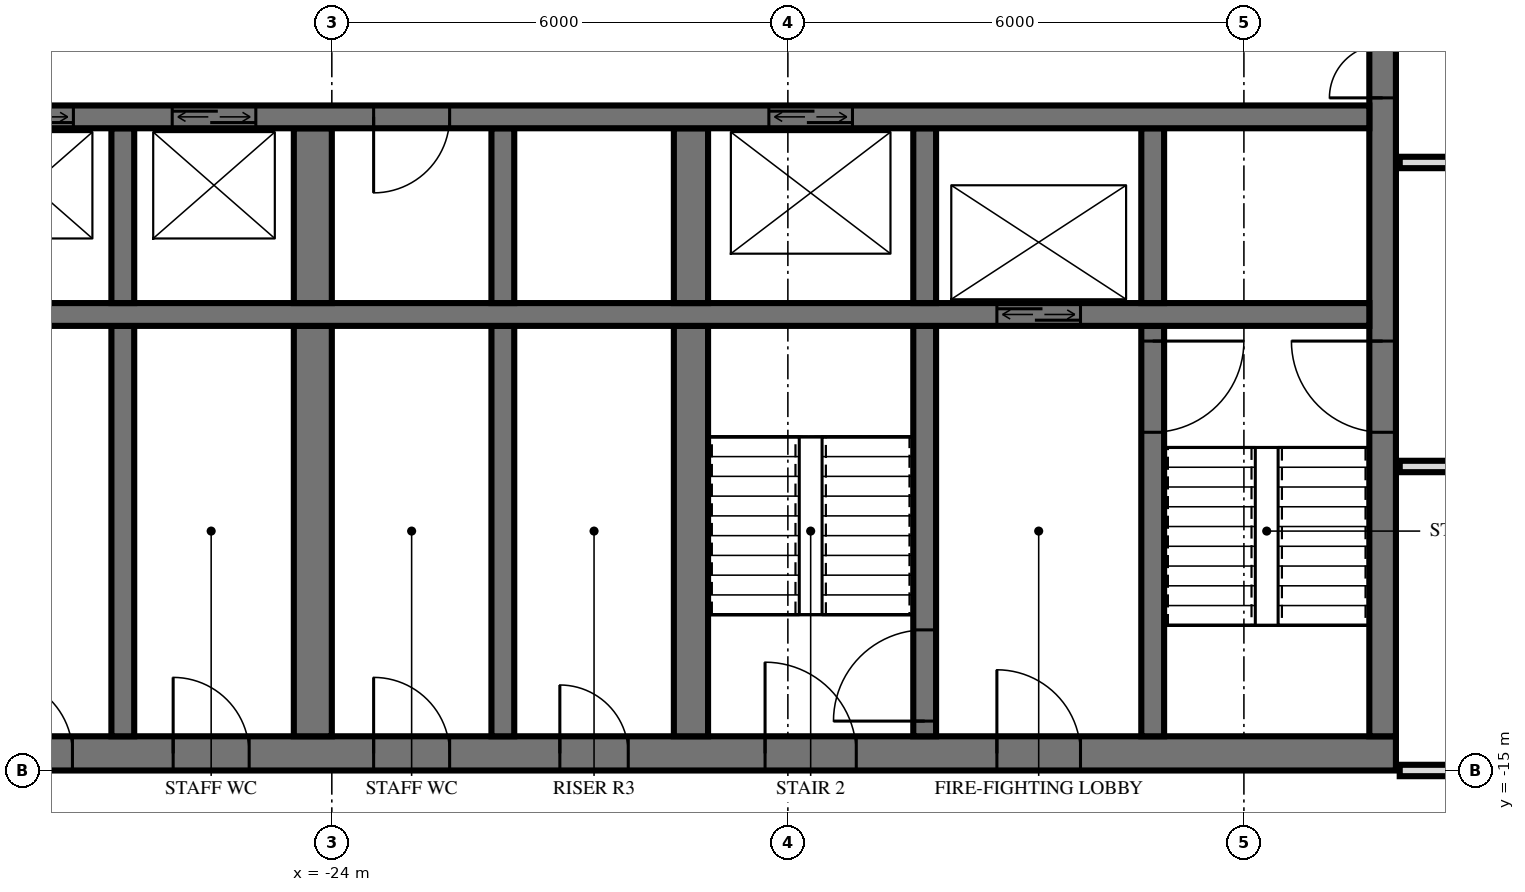
"""IFC4 building model, lengths in metres.
Left out: names, types, materials, properties, quantities, classifications, styles, units other than length and angle.
Written with IfcOpenShell. Run it as: python <this file> out.ifc"""

import sys

from ifc_helpers import new_model, si_unit, direction, frame, frame_2d, origin, place, context, subcontext, project, spatial, rectangle, extrude, element, fill, save


model = new_model("IFC4")
c1 = context("Model", 3, precision=1e-05, world=origin(), true_north=direction((0.0, 1.0)))
c2 = subcontext(c1, "Body", "Model", "MODEL_VIEW")
j1 = project(units=[si_unit("LENGTHUNIT", "METRE"), si_unit("PLANEANGLEUNIT", "RADIAN")], contexts=[c1])
p1 = place(None, origin())
s1 = spatial("IfcSite", under=j1, at=p1, CompositionType="ELEMENT")
p2 = place(p1, origin())
s2 = spatial("IfcBuilding", under=s1, at=p2, CompositionType="ELEMENT")
p3 = place(p2, frame((0.0, 0.0, 60.0)))
s3 = spatial("IfcBuildingStorey", under=s2, at=p3, CompositionType="ELEMENT", Elevation=60.0)
p4 = place(p3, frame((-29.5, -14.775, 0.0), z_axis=(0.0, 0.0, 1.0), x_axis=(1.0, 0.0, 0.0)))
e1 = element("IfcWall", 1, at=p4, inside=s3, PredefinedType="SHEAR", context=c2, shape_type="SweptSolid", body=[
    extrude(rectangle(XDim=19.5, YDim=0.45, at=frame_2d((9.75, 0.0))), origin(), (0.0, 0.0, 1.0), 3.6),
])
p5 = place(p4, frame((11.2, 0.0, 0.0)))
e2 = element("IfcOpeningElement", 2, at=p5, cuts=e1, PredefinedType="OPENING", context=c2, shape_type="SweptSolid", body=[
    extrude(rectangle(XDim=1.2, YDim=2.1, at=frame_2d((0.6, 1.05))), frame((0.0, 0.235, 0.0), z_axis=(0.0, -1.0, 0.0), x_axis=(1.0, 0.0, 0.0)), (0.0, 0.0, 1.0), 0.47),
])
p6 = place(p4, frame((14.25, 0.0, 0.0)))
e3 = element("IfcOpeningElement", 3, at=p6, cuts=e1, PredefinedType="OPENING", context=c2, shape_type="SweptSolid", body=[
    extrude(rectangle(XDim=1.1, YDim=2.1, at=frame_2d((0.55, 1.05))), frame((0.0, 0.235, 0.0), z_axis=(0.0, -1.0, 0.0), x_axis=(1.0, 0.0, 0.0)), (0.0, 0.0, 1.0), 0.47),
])
p7 = place(p4, frame((8.5, 0.0, 0.0)))
e4 = element("IfcOpeningElement", 4, at=p7, cuts=e1, PredefinedType="OPENING", context=c2, shape_type="SweptSolid", body=[
    extrude(rectangle(XDim=0.9, YDim=2.1, at=frame_2d((0.45, 1.05))), frame((0.0, 0.235, 0.0), z_axis=(0.0, -1.0, 0.0), x_axis=(1.0, 0.0, 0.0)), (0.0, 0.0, 1.0), 0.47),
])
p8 = place(p4, frame((6.05, 0.0, 0.0)))
e5 = element("IfcOpeningElement", 5, at=p8, cuts=e1, PredefinedType="OPENING", context=c2, shape_type="SweptSolid", body=[
    extrude(rectangle(XDim=1.0, YDim=2.1, at=frame_2d((0.5, 1.05))), frame((0.0, 0.235, 0.0), z_axis=(0.0, -1.0, 0.0), x_axis=(1.0, 0.0, 0.0)), (0.0, 0.0, 1.0), 0.47),
])
p9 = place(p4, frame((3.413, 0.0, 0.0)))
e6 = element("IfcOpeningElement", 6, at=p9, cuts=e1, PredefinedType="OPENING", context=c2, shape_type="SweptSolid", body=[
    extrude(rectangle(XDim=1.0, YDim=2.1, at=frame_2d((0.5, 1.05))), frame((0.0, 0.235, 0.0), z_axis=(0.0, -1.0, 0.0), x_axis=(1.0, 0.0, 0.0)), (0.0, 0.0, 1.0), 0.47),
])
p10 = place(p4, frame((1.087, 0.0, 0.0)))
e7 = element("IfcOpeningElement", 7, at=p10, cuts=e1, PredefinedType="OPENING", context=c2, shape_type="SweptSolid", body=[
    extrude(rectangle(XDim=1.0, YDim=2.1, at=frame_2d((0.5, 1.05))), frame((0.0, 0.235, 0.0), z_axis=(0.0, -1.0, 0.0), x_axis=(1.0, 0.0, 0.0)), (0.0, 0.0, 1.0), 0.47),
])
p11 = place(p3, frame((-10.175, -14.55, 0.0), z_axis=(0.0, 0.0, 1.0), x_axis=(0.0, 1.0, 0.0)))
e8 = element("IfcWall", 8, at=p11, inside=s3, PredefinedType="SHEAR", context=c2, shape_type="SweptSolid", body=[
    extrude(rectangle(XDim=14.1, YDim=0.35, at=frame_2d((7.05, 0.0))), origin(), (0.0, 0.0, 1.0), 3.6),
])
p12 = place(p11, frame((8.4, 0.0, 0.0)))
e9 = element("IfcOpeningElement", 9, at=p12, cuts=e8, PredefinedType="OPENING", context=c2, shape_type="SweptSolid", body=[
    extrude(rectangle(XDim=1.4, YDim=2.4, at=frame_2d((0.7, 1.2))), frame((0.0, 0.185, 0.0), z_axis=(0.0, -1.0, 0.0), x_axis=(1.0, 0.0, 0.0)), (0.0, 0.0, 1.0), 0.37),
])
p13 = place(p11, frame((10.0, 0.0, 0.0)))
e10 = element("IfcOpeningElement", 10, at=p13, cuts=e8, PredefinedType="OPENING", context=c2, shape_type="SweptSolid", body=[
    extrude(rectangle(XDim=1.4, YDim=2.4, at=frame_2d((0.7, 1.2))), frame((0.0, 0.185, 0.0), z_axis=(0.0, -1.0, 0.0), x_axis=(1.0, 0.0, 0.0)), (0.0, 0.0, 1.0), 0.37),
])
p14 = place(p11, frame((4.0, 0.0, 0.0)))
e11 = element("IfcOpeningElement", 11, at=p14, cuts=e8, PredefinedType="OPENING", context=c2, shape_type="SweptSolid", body=[
    extrude(rectangle(XDim=1.2, YDim=2.1, at=frame_2d((0.6, 1.05))), frame((0.0, 0.185, 0.0), z_axis=(0.0, -1.0, 0.0), x_axis=(1.0, 0.0, 0.0)), (0.0, 0.0, 1.0), 0.37),
])
p15 = place(p3, frame((-29.05, -6.4, 0.0), z_axis=(0.0, 0.0, 1.0), x_axis=(1.0, 0.0, 0.0)))
e12 = element("IfcWall", 12, at=p15, inside=s3, PredefinedType="SHEAR", context=c2, shape_type="SweptSolid", body=[
    extrude(rectangle(XDim=18.7, YDim=0.3, at=frame_2d((9.35, 0.0))), origin(), (0.0, 0.0, 1.0), 3.6),
])
p16 = place(p15, frame((2.95, 0.0, 0.0)))
e13 = element("IfcOpeningElement", 13, at=p16, cuts=e12, PredefinedType="OPENING", context=c2, shape_type="SweptSolid", body=[
    extrude(rectangle(XDim=1.1, YDim=2.1, at=frame_2d((0.55, 1.05))), frame((0.0, 0.16, 0.0), z_axis=(0.0, -1.0, 0.0), x_axis=(1.0, 0.0, 0.0)), (0.0, 0.0, 1.0), 0.32),
])
p17 = place(p15, frame((0.55, 0.0, 0.0)))
e14 = element("IfcOpeningElement", 14, at=p17, cuts=e12, PredefinedType="OPENING", context=c2, shape_type="SweptSolid", body=[
    extrude(rectangle(XDim=1.1, YDim=2.1, at=frame_2d((0.55, 1.05))), frame((0.0, 0.16, 0.0), z_axis=(0.0, -1.0, 0.0), x_axis=(1.0, 0.0, 0.0)), (0.0, 0.0, 1.0), 0.32),
])
p18 = place(p15, frame((10.8, 0.0, 0.0)))
e15 = element("IfcOpeningElement", 15, at=p18, cuts=e12, PredefinedType="OPENING", context=c2, shape_type="SweptSolid", body=[
    extrude(rectangle(XDim=1.1, YDim=2.1, at=frame_2d((0.55, 1.05))), frame((0.0, 0.16, 0.0), z_axis=(0.0, -1.0, 0.0), x_axis=(1.0, 0.0, 0.0)), (0.0, 0.0, 1.0), 0.32),
])
p19 = place(p15, frame((5.6, 0.0, 0.0)))
e16 = element("IfcOpeningElement", 16, at=p19, cuts=e12, PredefinedType="OPENING", context=c2, shape_type="SweptSolid", body=[
    extrude(rectangle(XDim=1.0, YDim=2.1, at=frame_2d((0.5, 1.05))), frame((0.0, 0.16, 0.0), z_axis=(0.0, -1.0, 0.0), x_axis=(1.0, 0.0, 0.0)), (0.0, 0.0, 1.0), 0.32),
])
p20 = place(p3, frame((-29.05, -9.0, 0.0), z_axis=(0.0, 0.0, 1.0), x_axis=(1.0, 0.0, 0.0)))
e17 = element("IfcWall", 17, at=p20, inside=s3, PredefinedType="SHEAR", context=c2, shape_type="SweptSolid", body=[
    extrude(rectangle(XDim=18.7, YDim=0.3, at=frame_2d((9.35, 0.0))), origin(), (0.0, 0.0, 1.0), 3.6),
])
p21 = place(p20, frame((13.8, 0.0, 0.0)))
e18 = element("IfcOpeningElement", 18, at=p21, cuts=e17, PredefinedType="OPENING", context=c2, shape_type="SweptSolid", body=[
    extrude(rectangle(XDim=1.1, YDim=2.1, at=frame_2d((0.55, 1.05))), frame((0.0, 0.16, 0.0), z_axis=(0.0, -1.0, 0.0), x_axis=(1.0, 0.0, 0.0)), (0.0, 0.0, 1.0), 0.32),
])
p22 = place(p3, frame((-13.2, -8.85, 0.0), z_axis=(0.0, 0.0, 1.0), x_axis=(0.0, 1.0, 0.0)))
e19 = element("IfcWall", 19, at=p22, inside=s3, PredefinedType="SHEAR", context=c2, shape_type="SweptSolid", body=[
    extrude(rectangle(XDim=2.3, YDim=0.3, at=frame_2d((1.15, 0.0))), origin(), (0.0, 0.0, 1.0), 3.6),
])
p23 = place(p3, frame((-13.2, -14.55, 0.0), z_axis=(0.0, 0.0, 1.0), x_axis=(0.0, 1.0, 0.0)))
e20 = element("IfcWall", 20, at=p23, inside=s3, PredefinedType="SHEAR", context=c2, shape_type="SweptSolid", body=[
    extrude(rectangle(XDim=5.4, YDim=0.3, at=frame_2d((2.7, 0.0))), origin(), (0.0, 0.0, 1.0), 3.6),
])
p24 = place(p23, frame((4.0, 0.0, 0.0)))
e21 = element("IfcOpeningElement", 21, at=p24, cuts=e20, PredefinedType="OPENING", context=c2, shape_type="SweptSolid", body=[
    extrude(rectangle(XDim=1.2, YDim=2.1, at=frame_2d((0.6, 1.05))), frame((0.0, 0.16, 0.0), z_axis=(0.0, -1.0, 0.0), x_axis=(1.0, 0.0, 0.0)), (0.0, 0.0, 1.0), 0.32),
])
p25 = place(p3, frame((-16.2, -8.85, 0.0), z_axis=(0.0, 0.0, 1.0), x_axis=(0.0, 1.0, 0.0)))
e22 = element("IfcWall", 22, at=p25, inside=s3, PredefinedType="SHEAR", context=c2, shape_type="SweptSolid", body=[
    extrude(rectangle(XDim=2.3, YDim=0.3, at=frame_2d((1.15, 0.0))), origin(), (0.0, 0.0, 1.0), 3.6),
])
p26 = place(p3, frame((-16.2, -14.55, 0.0), z_axis=(0.0, 0.0, 1.0), x_axis=(0.0, 1.0, 0.0)))
e23 = element("IfcWall", 23, at=p26, inside=s3, PredefinedType="SHEAR", context=c2, shape_type="SweptSolid", body=[
    extrude(rectangle(XDim=5.4, YDim=0.3, at=frame_2d((2.7, 0.0))), origin(), (0.0, 0.0, 1.0), 3.6),
])
p27 = place(p26, frame((0.2, 0.0, 0.0)))
e24 = element("IfcOpeningElement", 24, at=p27, cuts=e23, PredefinedType="OPENING", context=c2, shape_type="SweptSolid", body=[
    extrude(rectangle(XDim=1.2, YDim=2.1, at=frame_2d((0.6, 1.05))), frame((0.0, 0.16, 0.0), z_axis=(0.0, -1.0, 0.0), x_axis=(1.0, 0.0, 0.0)), (0.0, 0.0, 1.0), 0.32),
])
p28 = place(p3, frame((-19.275, -8.85, 0.0), z_axis=(0.0, 0.0, 1.0), x_axis=(0.0, 1.0, 0.0)))
e25 = element("IfcWall", 25, at=p28, inside=s3, PredefinedType="SHEAR", context=c2, shape_type="SweptSolid", body=[
    extrude(rectangle(XDim=2.3, YDim=0.45, at=frame_2d((1.15, 0.0))), origin(), (0.0, 0.0, 1.0), 3.6),
])
p29 = place(p3, frame((-19.275, -14.55, 0.0), z_axis=(0.0, 0.0, 1.0), x_axis=(0.0, 1.0, 0.0)))
e26 = element("IfcWall", 26, at=p29, inside=s3, PredefinedType="SHEAR", context=c2, shape_type="SweptSolid", body=[
    extrude(rectangle(XDim=5.4, YDim=0.45, at=frame_2d((2.7, 0.0))), origin(), (0.0, 0.0, 1.0), 3.6),
])
p30 = place(p3, frame((-21.75, -8.85, 0.0), z_axis=(0.0, 0.0, 1.0), x_axis=(0.0, 1.0, 0.0)))
e27 = element("IfcWall", 27, at=p30, inside=s3, PredefinedType="SHEAR", context=c2, shape_type="SweptSolid", body=[
    extrude(rectangle(XDim=2.3, YDim=0.3, at=frame_2d((1.15, 0.0))), origin(), (0.0, 0.0, 1.0), 3.6),
])
p31 = place(p3, frame((-21.75, -14.55, 0.0), z_axis=(0.0, 0.0, 1.0), x_axis=(0.0, 1.0, 0.0)))
e28 = element("IfcWall", 28, at=p31, inside=s3, PredefinedType="SHEAR", context=c2, shape_type="SweptSolid", body=[
    extrude(rectangle(XDim=5.4, YDim=0.3, at=frame_2d((2.7, 0.0))), origin(), (0.0, 0.0, 1.0), 3.6),
])
p32 = place(p3, frame((-24.25, -8.85, 0.0), z_axis=(0.0, 0.0, 1.0), x_axis=(0.0, 1.0, 0.0)))
e29 = element("IfcWall", 29, at=p32, inside=s3, PredefinedType="SHEAR", context=c2, shape_type="SweptSolid", body=[
    extrude(rectangle(XDim=2.3, YDim=0.5, at=frame_2d((1.15, 0.0))), origin(), (0.0, 0.0, 1.0), 3.6),
])
p33 = place(p3, frame((-24.25, -14.55, 0.0), z_axis=(0.0, 0.0, 1.0), x_axis=(0.0, 1.0, 0.0)))
e30 = element("IfcWall", 30, at=p33, inside=s3, PredefinedType="SHEAR", context=c2, shape_type="SweptSolid", body=[
    extrude(rectangle(XDim=5.4, YDim=0.5, at=frame_2d((2.7, 0.0))), origin(), (0.0, 0.0, 1.0), 3.6),
])
p34 = place(p3, frame((-26.75, -8.85, 0.0), z_axis=(0.0, 0.0, 1.0), x_axis=(0.0, 1.0, 0.0)))
e31 = element("IfcWall", 31, at=p34, inside=s3, PredefinedType="SHEAR", context=c2, shape_type="SweptSolid", body=[
    extrude(rectangle(XDim=2.3, YDim=0.3, at=frame_2d((1.15, 0.0))), origin(), (0.0, 0.0, 1.0), 3.6),
])
p35 = place(p3, frame((-26.75, -14.55, 0.0), z_axis=(0.0, 0.0, 1.0), x_axis=(0.0, 1.0, 0.0)))
e32 = element("IfcWall", 32, at=p35, inside=s3, PredefinedType="SHEAR", context=c2, shape_type="SweptSolid", body=[
    extrude(rectangle(XDim=5.4, YDim=0.3, at=frame_2d((2.7, 0.0))), origin(), (0.0, 0.0, 1.0), 3.6),
])
p36 = place(p3, frame((-9.95, -15.0, 0.0), z_axis=(0.0, 0.0, 1.0), x_axis=(1.0, 0.0, 0.0)))
e33 = element("IfcWall", 33, at=p36, inside=s3, PredefinedType="PARTITIONING", context=c2, shape_type="SweptSolid", body=[
    extrude(rectangle(XDim=19.9, YDim=0.15, at=frame_2d((9.95, 0.0))), origin(), (0.0, 0.0, 1.0), 2.684),
])
p37 = place(p36, frame((9.45, 0.0, 0.0)))
e34 = element("IfcOpeningElement", 34, at=p37, cuts=e33, PredefinedType="OPENING", context=c2, shape_type="SweptSolid", body=[
    extrude(rectangle(XDim=1.0, YDim=2.1, at=frame_2d((0.5, 1.05))), frame((0.0, 0.085, 0.0), z_axis=(0.0, -1.0, 0.0), x_axis=(1.0, 0.0, 0.0)), (0.0, 0.0, 1.0), 0.17),
])
p38 = place(p3, frame((-9.95, -11.0, 0.0), z_axis=(0.0, 0.0, 1.0), x_axis=(1.0, 0.0, 0.0)))
e35 = element("IfcWall", 35, at=p38, inside=s3, PredefinedType="PARTITIONING", context=c2, shape_type="SweptSolid", body=[
    extrude(rectangle(XDim=19.9, YDim=0.15, at=frame_2d((9.95, 0.0))), origin(), (0.0, 0.0, 1.0), 3.32),
])
p39 = place(p38, frame((9.45, 0.0, 0.0)))
e36 = element("IfcOpeningElement", 36, at=p39, cuts=e35, PredefinedType="OPENING", context=c2, shape_type="SweptSolid", body=[
    extrude(rectangle(XDim=1.0, YDim=2.1, at=frame_2d((0.5, 1.05))), frame((0.0, 0.085, 0.0), z_axis=(0.0, -1.0, 0.0), x_axis=(1.0, 0.0, 0.0)), (0.0, 0.0, 1.0), 0.17),
])
p40 = place(p38, frame((3.45, 0.0, 0.0)))
e37 = element("IfcOpeningElement", 37, at=p40, cuts=e35, PredefinedType="OPENING", context=c2, shape_type="SweptSolid", body=[
    extrude(rectangle(XDim=1.0, YDim=2.1, at=frame_2d((0.5, 1.05))), frame((0.0, 0.085, 0.0), z_axis=(0.0, -1.0, 0.0), x_axis=(1.0, 0.0, 0.0)), (0.0, 0.0, 1.0), 0.17),
])
p41 = place(p3, frame((-9.95, -7.0, 0.0), z_axis=(0.0, 0.0, 1.0), x_axis=(1.0, 0.0, 0.0)))
e38 = element("IfcWall", 38, at=p41, inside=s3, PredefinedType="PARTITIONING", context=c2, shape_type="SweptSolid", body=[
    extrude(rectangle(XDim=19.9, YDim=0.15, at=frame_2d((9.95, 0.0))), origin(), (0.0, 0.0, 1.0), 3.32),
])
p42 = place(p41, frame((9.45, 0.0, 0.0)))
e39 = element("IfcOpeningElement", 39, at=p42, cuts=e38, PredefinedType="OPENING", context=c2, shape_type="SweptSolid", body=[
    extrude(rectangle(XDim=1.0, YDim=2.1, at=frame_2d((0.5, 1.05))), frame((0.0, 0.085, 0.0), z_axis=(0.0, -1.0, 0.0), x_axis=(1.0, 0.0, 0.0)), (0.0, 0.0, 1.0), 0.17),
])
p43 = place(p41, frame((15.45, 0.0, 0.0)))
e40 = element("IfcOpeningElement", 40, at=p43, cuts=e38, PredefinedType="OPENING", context=c2, shape_type="SweptSolid", body=[
    extrude(rectangle(XDim=1.0, YDim=2.1, at=frame_2d((0.5, 1.05))), frame((0.0, 0.085, 0.0), z_axis=(0.0, -1.0, 0.0), x_axis=(1.0, 0.0, 0.0)), (0.0, 0.0, 1.0), 0.17),
])
p44 = place(p16, origin())
e41 = element("IfcDoor", 41, at=p44, inside=s3, OperationType="DOUBLE_DOOR_SLIDING", PredefinedType="USERDEFINED", context=c2, shape_type="SweptSolid", body=[
    extrude(rectangle(XDim=1.1, YDim=2.1, at=frame_2d((0.55, 1.05))), frame((0.0, 0.025, 0.0), z_axis=(0.0, -1.0, 0.0), x_axis=(1.0, 0.0, 0.0)), (0.0, 0.0, 1.0), 0.05),
])
fill(e13, e41)
p45 = place(p17, origin())
e42 = element("IfcDoor", 42, at=p45, inside=s3, OperationType="DOUBLE_DOOR_SLIDING", PredefinedType="USERDEFINED", context=c2, shape_type="SweptSolid", body=[
    extrude(rectangle(XDim=1.1, YDim=2.1, at=frame_2d((0.55, 1.05))), frame((0.0, 0.025, 0.0), z_axis=(0.0, -1.0, 0.0), x_axis=(1.0, 0.0, 0.0)), (0.0, 0.0, 1.0), 0.05),
])
fill(e14, e42)
p46 = place(p21, origin())
e43 = element("IfcDoor", 43, at=p46, inside=s3, OperationType="DOUBLE_DOOR_SLIDING", PredefinedType="USERDEFINED", context=c2, shape_type="SweptSolid", body=[
    extrude(rectangle(XDim=1.1, YDim=2.1, at=frame_2d((0.55, 1.05))), frame((0.0, 0.025, 0.0), z_axis=(0.0, -1.0, 0.0), x_axis=(1.0, 0.0, 0.0)), (0.0, 0.0, 1.0), 0.05),
])
fill(e18, e43)
p47 = place(p18, origin())
e44 = element("IfcDoor", 44, at=p47, inside=s3, OperationType="DOUBLE_DOOR_SLIDING", PredefinedType="USERDEFINED", context=c2, shape_type="SweptSolid", body=[
    extrude(rectangle(XDim=1.1, YDim=2.1, at=frame_2d((0.55, 1.05))), frame((0.0, 0.025, 0.0), z_axis=(0.0, -1.0, 0.0), x_axis=(1.0, 0.0, 0.0)), (0.0, 0.0, 1.0), 0.05),
])
fill(e15, e44)
p48 = place(p12, origin())
e45 = element("IfcDoor", 45, at=p48, inside=s3, OperationType="DOUBLE_DOOR_SINGLE_SWING", PredefinedType="DOOR", context=c2, shape_type="SweptSolid", body=[
    extrude(rectangle(XDim=1.4, YDim=2.4, at=frame_2d((0.7, 1.2))), frame((0.0, 0.025, 0.0), z_axis=(0.0, -1.0, 0.0), x_axis=(1.0, 0.0, 0.0)), (0.0, 0.0, 1.0), 0.05),
])
fill(e9, e45)
p49 = place(p14, origin())
e46 = element("IfcDoor", 46, at=p49, inside=s3, OperationType="SINGLE_SWING_LEFT", PredefinedType="DOOR", context=c2, shape_type="SweptSolid", body=[
    extrude(rectangle(XDim=1.2, YDim=2.1, at=frame_2d((0.6, 1.05))), frame((0.0, 0.025, 0.0), z_axis=(0.0, -1.0, 0.0), x_axis=(1.0, 0.0, 0.0)), (0.0, 0.0, 1.0), 0.05),
])
fill(e11, e46)
p50 = place(p5, origin())
e47 = element("IfcDoor", 47, at=p50, inside=s3, OperationType="SINGLE_SWING_RIGHT", PredefinedType="DOOR", context=c2, shape_type="SweptSolid", body=[
    extrude(rectangle(XDim=1.2, YDim=2.1, at=frame_2d((0.6, 1.05))), frame((0.0, 0.025, 0.0), z_axis=(0.0, -1.0, 0.0), x_axis=(1.0, 0.0, 0.0)), (0.0, 0.0, 1.0), 0.05),
])
fill(e2, e47)
p51 = place(p6, origin())
e48 = element("IfcDoor", 48, at=p51, inside=s3, OperationType="SINGLE_SWING_RIGHT", PredefinedType="DOOR", context=c2, shape_type="SweptSolid", body=[
    extrude(rectangle(XDim=1.1, YDim=2.1, at=frame_2d((0.55, 1.05))), frame((0.0, 0.025, 0.0), z_axis=(0.0, -1.0, 0.0), x_axis=(1.0, 0.0, 0.0)), (0.0, 0.0, 1.0), 0.05),
])
fill(e3, e48)
p52 = place(p7, origin())
e49 = element("IfcDoor", 49, at=p52, inside=s3, OperationType="SINGLE_SWING_RIGHT", PredefinedType="DOOR", context=c2, shape_type="SweptSolid", body=[
    extrude(rectangle(XDim=0.9, YDim=2.1, at=frame_2d((0.45, 1.05))), frame((0.0, 0.025, 0.0), z_axis=(0.0, -1.0, 0.0), x_axis=(1.0, 0.0, 0.0)), (0.0, 0.0, 1.0), 0.05),
])
fill(e4, e49)
p53 = place(p8, origin())
e50 = element("IfcDoor", 50, at=p53, inside=s3, OperationType="SINGLE_SWING_RIGHT", PredefinedType="DOOR", context=c2, shape_type="SweptSolid", body=[
    extrude(rectangle(XDim=1.0, YDim=2.1, at=frame_2d((0.5, 1.05))), frame((0.0, 0.025, 0.0), z_axis=(0.0, -1.0, 0.0), x_axis=(1.0, 0.0, 0.0)), (0.0, 0.0, 1.0), 0.05),
])
fill(e5, e50)
p54 = place(p9, origin())
e51 = element("IfcDoor", 51, at=p54, inside=s3, OperationType="SINGLE_SWING_RIGHT", PredefinedType="DOOR", context=c2, shape_type="SweptSolid", body=[
    extrude(rectangle(XDim=1.0, YDim=2.1, at=frame_2d((0.5, 1.05))), frame((0.0, 0.025, 0.0), z_axis=(0.0, -1.0, 0.0), x_axis=(1.0, 0.0, 0.0)), (0.0, 0.0, 1.0), 0.05),
])
fill(e6, e51)
p55 = place(p10, origin())
e52 = element("IfcDoor", 52, at=p55, inside=s3, OperationType="SINGLE_SWING_RIGHT", PredefinedType="DOOR", context=c2, shape_type="SweptSolid", body=[
    extrude(rectangle(XDim=1.0, YDim=2.1, at=frame_2d((0.5, 1.05))), frame((0.0, 0.025, 0.0), z_axis=(0.0, -1.0, 0.0), x_axis=(1.0, 0.0, 0.0)), (0.0, 0.0, 1.0), 0.05),
])
fill(e7, e52)
p56 = place(p19, frame((0.5, 0.0, 0.0), z_axis=(0.0, 0.0, 1.0), x_axis=(-1.0, 0.0, 0.0)))
e53 = element("IfcDoor", 53, at=p56, inside=s3, OperationType="SINGLE_SWING_LEFT", PredefinedType="DOOR", context=c2, shape_type="SweptSolid", body=[
    extrude(rectangle(XDim=1.0, YDim=2.1, at=frame_2d((0.0, 1.05))), frame((0.0, -0.025, 0.0), z_axis=(0.0, 1.0, 0.0), x_axis=(-1.0, 0.0, 0.0)), (0.0, 0.0, 1.0), 0.05),
])
fill(e16, e53)
p57 = place(p24, frame((0.6, 0.0, 0.0), z_axis=(0.0, 0.0, 1.0), x_axis=(-1.0, 0.0, 0.0)))
e54 = element("IfcDoor", 54, at=p57, inside=s3, OperationType="SINGLE_SWING_RIGHT", PredefinedType="DOOR", context=c2, shape_type="SweptSolid", body=[
    extrude(rectangle(XDim=1.2, YDim=2.1, at=frame_2d((0.0, 1.05))), frame((0.0, -0.025, 0.0), z_axis=(0.0, 1.0, 0.0), x_axis=(-1.0, 0.0, 0.0)), (0.0, 0.0, 1.0), 0.05),
])
fill(e21, e54)
p58 = place(p27, origin())
e55 = element("IfcDoor", 55, at=p58, inside=s3, OperationType="SINGLE_SWING_RIGHT", PredefinedType="DOOR", context=c2, shape_type="SweptSolid", body=[
    extrude(rectangle(XDim=1.2, YDim=2.1, at=frame_2d((0.6, 1.05))), frame((0.0, 0.025, 0.0), z_axis=(0.0, -1.0, 0.0), x_axis=(1.0, 0.0, 0.0)), (0.0, 0.0, 1.0), 0.05),
])
fill(e24, e55)
save(model, sys.argv[1])
